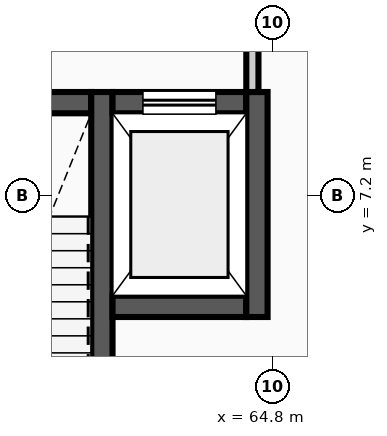
"""IFC4 building model, lengths in metres.
Left out: names, types, materials, properties, quantities, classifications, styles, units other than length and angle.
Written with IfcOpenShell. Run it as: python <this file> out.ifc"""

import sys

from ifc_helpers import new_model, si_unit, direction, frame, frame_2d, origin, place, context, subcontext, project, spatial, rectangle, extrude, element, fill, save


model = new_model("IFC4")
c1 = context("Model", 3, precision=1e-05, world=origin(), true_north=direction((0.0, 1.0)))
c2 = subcontext(c1, "Body", "Model", "MODEL_VIEW")
j1 = project(units=[si_unit("LENGTHUNIT", "METRE"), si_unit("PLANEANGLEUNIT", "RADIAN")], contexts=[c1])
p1 = place(None, origin())
s1 = spatial("IfcSite", under=j1, at=p1, CompositionType="ELEMENT")
p2 = place(p1, origin())
s2 = spatial("IfcBuilding", under=s1, at=p2, CompositionType="ELEMENT")
p3 = place(p2, origin())
s3 = spatial("IfcBuildingStorey", under=s2, at=p3, CompositionType="ELEMENT", Elevation=0.0)
p4 = place(p3, frame((58.67, 8.725, 0.0), z_axis=(0.0, 0.0, 1.0), x_axis=(1.0, 0.0, 0.0)))
e1 = element("IfcWall", 1, at=p4, inside=s3, PredefinedType="SHEAR", context=c2, shape_type="SweptSolid", body=[
    extrude(rectangle(XDim=3.15, YDim=0.35, at=frame_2d((1.575, 0.0))), origin(), (0.0, 0.0, 1.0), 4.97),
])
p5 = place(p4, frame((1.025, 0.0, 0.0)))
e2 = element("IfcOpeningElement", 2, at=p5, cuts=e1, PredefinedType="OPENING", context=c2, shape_type="SweptSolid", body=[
    extrude(rectangle(XDim=1.1, YDim=2.15, at=frame_2d((0.55, 1.075))), frame((0.0, 0.185, 0.0), z_axis=(0.0, -1.0, 0.0), x_axis=(1.0, 0.0, 0.0)), (0.0, 0.0, 1.0), 0.37),
])
p6 = place(p3, frame((61.995, 0.4, 0.0), z_axis=(0.0, 0.0, 1.0), x_axis=(0.0, 1.0, 0.0)))
e3 = element("IfcWall", 3, at=p6, inside=s3, PredefinedType="SHEAR", context=c2, shape_type="SweptSolid", body=[
    extrude(rectangle(XDim=8.5, YDim=0.35, at=frame_2d((4.25, 0.0))), origin(), (0.0, 0.0, 1.0), 4.97),
])
p7 = place(p3, frame((62.17, 5.375, 0.0), z_axis=(0.0, 0.0, 1.0), x_axis=(1.0, 0.0, 0.0)))
e4 = element("IfcWall", 4, at=p7, inside=s3, PredefinedType="SHEAR", context=c2, shape_type="SweptSolid", body=[
    extrude(rectangle(XDim=2.2, YDim=0.35, at=frame_2d((1.1, 0.0))), origin(), (0.0, 0.0, 1.0), 4.97),
])
p8 = place(p3, frame((62.17, 8.725, 0.0), z_axis=(0.0, 0.0, 1.0), x_axis=(1.0, 0.0, 0.0)))
e5 = element("IfcWall", 5, at=p8, inside=s3, PredefinedType="SHEAR", context=c2, shape_type="SweptSolid", body=[
    extrude(rectangle(XDim=2.2, YDim=0.35, at=frame_2d((1.1, 0.0))), origin(), (0.0, 0.0, 1.0), 4.97),
])
p9 = place(p8, frame((0.5, 0.0, 0.0)))
e6 = element("IfcOpeningElement", 6, at=p9, cuts=e5, PredefinedType="OPENING", context=c2, shape_type="SweptSolid", body=[
    extrude(rectangle(XDim=1.2, YDim=2.2, at=frame_2d((0.6, 1.1))), frame((0.0, 0.185, 0.0), z_axis=(0.0, -1.0, 0.0), x_axis=(1.0, 0.0, 0.0)), (0.0, 0.0, 1.0), 0.37),
])
p10 = place(p3, frame((64.545, 5.2, 0.0), z_axis=(0.0, 0.0, 1.0), x_axis=(0.0, 1.0, 0.0)))
e7 = element("IfcWall", 7, at=p10, inside=s3, PredefinedType="SHEAR", context=c2, shape_type="SweptSolid", body=[
    extrude(rectangle(XDim=3.7, YDim=0.35, at=frame_2d((1.85, 0.0))), origin(), (0.0, 0.0, 1.0), 4.97),
])
p11 = place(p3, frame((64.47, 8.9, 0.0), z_axis=(0.0, 0.0, 1.0), x_axis=(0.0, 1.0, 0.0)))
e8 = element("IfcWall", 8, at=p11, inside=s3, PredefinedType="PARTITIONING", context=c2, shape_type="SweptSolid", body=[
    extrude(rectangle(XDim=2.45, YDim=0.2, at=frame_2d((1.225, 0.0))), origin(), (0.0, 0.0, 1.0), 4.97),
])
p12 = place(p9, origin())
e9 = element("IfcDoor", 9, at=p12, inside=s3, OperationType="SLIDING_TO_RIGHT", PredefinedType="DOOR", context=c2, shape_type="SweptSolid", body=[
    extrude(rectangle(XDim=1.2, YDim=2.2, at=frame_2d((0.6, 1.1))), frame((0.0, 0.025, 0.0), z_axis=(0.0, -1.0, 0.0), x_axis=(1.0, 0.0, 0.0)), (0.0, 0.0, 1.0), 0.05),
])
fill(e6, e9)
save(model, sys.argv[1])
